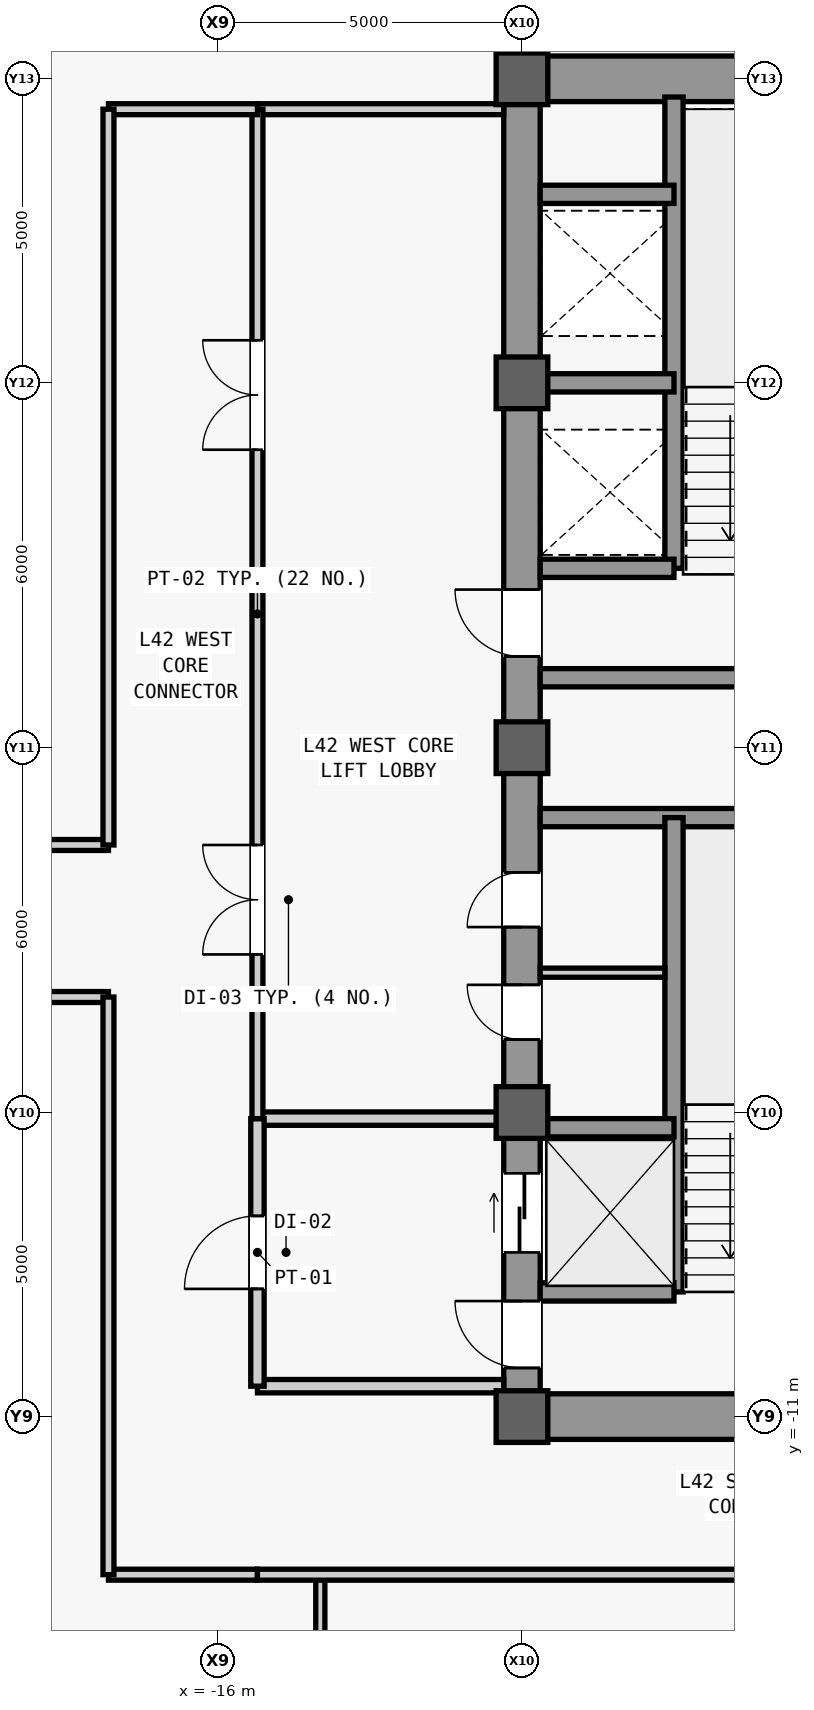
"""IFC4 building model, lengths in metres.
Left out: names, types, materials, properties, quantities, classifications, styles, units other than length and angle.
Written with IfcOpenShell. Run it as: python <this file> out.ifc"""

import sys

from ifc_helpers import new_model, si_unit, direction, frame, frame_2d, origin, origin_2d, place, context, subcontext, project, spatial, rectangle, extrude, source, transform, mapped, element, fill, save


model = new_model("IFC4")
c1 = context("Model", 3, precision=1e-05, world=origin(), true_north=direction((0.0, 1.0)))
c2 = subcontext(c1, "Body", "Model", "MODEL_VIEW")
j1 = project(units=[si_unit("LENGTHUNIT", "METRE"), si_unit("PLANEANGLEUNIT", "RADIAN")], contexts=[c1])
p1 = place(None, origin())
s1 = spatial("IfcSite", under=j1, at=p1, CompositionType="ELEMENT")
p2 = place(p1, origin())
s2 = spatial("IfcBuilding", under=s1, at=p2, CompositionType="ELEMENT")
p3 = place(p2, frame((0.0, 0.0, 183.1)))
s3 = spatial("IfcBuildingStorey", under=s2, at=p3, CompositionType="ELEMENT", Elevation=183.1)
m1 = source(origin(), c2, "Body", "SweptSolid", [
    extrude(rectangle(XDim=22.0, YDim=0.6, at=frame_2d((11.0, 0.0))), origin(), (0.0, 0.0, 1.0), 3.78),
])
p4 = place(p3, frame((-11.0, -11.0, 0.0), z_axis=(0.0, 0.0, 1.0), x_axis=(0.0, 1.0, 0.0)))
e1 = element("IfcWall", 1, at=p4, inside=s3, PredefinedType="SHEAR", context=c2, shape_type="MappedRepresentation", body=[
    mapped(m1, transform((0.0, 0.0, 0.0), scale=1.0)),
])
m2 = source(origin(), c2, "Body", "SweptSolid", [
    extrude(rectangle(XDim=1.1, YDim=2.2, at=frame_2d((0.55, 1.1))), frame((0.0, 0.31, 0.0), z_axis=(0.0, -1.0, 0.0), x_axis=(1.0, 0.0, 0.0)), (0.0, 0.0, 1.0), 0.62),
])
p5 = place(p4, frame((0.8, 0.0, 0.0)))
e2 = element("IfcOpeningElement", 2, at=p5, cuts=e1, PredefinedType="OPENING", context=c2, shape_type="MappedRepresentation", body=[
    mapped(m2, transform((0.0, 0.0, 0.0), scale=1.0)),
])
p6 = place(p4, frame((12.5, 0.0, 0.0)))
e3 = element("IfcOpeningElement", 3, at=p6, cuts=e1, PredefinedType="OPENING", context=c2, shape_type="MappedRepresentation", body=[
    mapped(m2, transform((0.0, 0.0, 0.0), scale=1.0)),
])
m3 = source(origin(), c2, "Body", "SweptSolid", [
    extrude(rectangle(XDim=0.9, YDim=2.15, at=frame_2d((0.45, 1.075))), frame((0.0, 0.31, 0.0), z_axis=(0.0, -1.0, 0.0), x_axis=(1.0, 0.0, 0.0)), (0.0, 0.0, 1.0), 0.62),
])
p7 = place(p4, frame((6.2, 0.0, 0.0)))
e4 = element("IfcOpeningElement", 4, at=p7, cuts=e1, PredefinedType="OPENING", context=c2, shape_type="MappedRepresentation", body=[
    mapped(m3, transform((0.0, 0.0, 0.0), scale=1.0)),
])
p8 = place(p4, frame((8.05, 0.0, 0.0)))
e5 = element("IfcOpeningElement", 5, at=p8, cuts=e1, PredefinedType="OPENING", context=c2, shape_type="MappedRepresentation", body=[
    mapped(m3, transform((0.0, 0.0, 0.0), scale=1.0)),
])
m4 = source(origin(), c2, "Body", "SweptSolid", [
    extrude(rectangle(XDim=1.3, YDim=2.3, at=frame_2d((0.65, 1.15))), frame((0.0, 0.31, 0.0), z_axis=(0.0, -1.0, 0.0), x_axis=(1.0, 0.0, 0.0)), (0.0, 0.0, 1.0), 0.62),
])
p9 = place(p4, frame((2.7, 0.0, 0.0)))
e6 = element("IfcOpeningElement", 6, at=p9, cuts=e1, PredefinedType="OPENING", context=c2, shape_type="MappedRepresentation", body=[
    mapped(m4, transform((0.0, 0.0, 0.0), scale=1.0)),
])
m5 = source(origin(), c2, "Body", "SweptSolid", [
    extrude(rectangle(XDim=5.85, YDim=0.75, at=frame_2d((2.925, 0.0))), origin(), (0.0, 0.0, 1.0), 3.78),
])
for number, where, z_axis, x_axis in (
    (7, (-10.7, -11.0, 0.0), (0.0, 0.0, 1.0), (1.0, 0.0, 0.0)),
    (8, (-10.7, 11.0, 0.0), (0.0, 0.0, 1.0), (1.0, 0.0, 0.0)),
):
    element("IfcWall", number, at=place(p3, frame(where, z_axis=z_axis, x_axis=x_axis)), inside=s3, PredefinedType="SHEAR", context=c2, shape_type="MappedRepresentation", body=[
        mapped(m5, transform((0.0, 0.0, 0.0), scale=1.0)),
    ])
m6 = source(origin(), c2, "Body", "SweptSolid", [
    extrude(rectangle(XDim=5.6, YDim=0.3, at=frame_2d((2.8, 0.0))), origin(), (0.0, 0.0, 1.0), 3.78),
])
for number, where, z_axis, x_axis in (
    (9, (-10.7, -1.15, 0.0), (0.0, 0.0, 1.0), (1.0, 0.0, 0.0)),
    (10, (-10.7, 1.15, 0.0), (0.0, 0.0, 1.0), (1.0, 0.0, 0.0)),
):
    element("IfcWall", number, at=place(p3, frame(where, z_axis=z_axis, x_axis=x_axis)), inside=s3, PredefinedType="SHEAR", context=c2, shape_type="MappedRepresentation", body=[
        mapped(m6, transform((0.0, 0.0, 0.0), scale=1.0)),
    ])
m7 = source(origin(), c2, "Body", "SweptSolid", [
    extrude(rectangle(XDim=0.85, YDim=0.85, at=origin_2d()), origin(), (0.0, 0.0, 1.0), 4.0),
])
for number, where, z_axis, x_axis in (
    (11, (-11.0, -11.0, 0.0), (0.0, 0.0, 1.0), (1.0, 0.0, 0.0)),
    (12, (-11.0, -6.0, 0.0), (0.0, 0.0, 1.0), (1.0, 0.0, 0.0)),
    (13, (-11.0, 0.0, 0.0), (0.0, 0.0, 1.0), (1.0, 0.0, 0.0)),
    (14, (-11.0, 6.0, 0.0), (0.0, 0.0, 1.0), (1.0, 0.0, 0.0)),
    (15, (-11.0, 11.0, 0.0), (0.0, 0.0, 1.0), (1.0, 0.0, 0.0)),
):
    element("IfcColumn", number, at=place(p3, frame(where, z_axis=z_axis, x_axis=x_axis)), inside=s3, PredefinedType="COLUMN", context=c2, shape_type="MappedRepresentation", body=[
        mapped(m7, transform((0.0, 0.0, 0.0), scale=1.0)),
    ])
m8 = source(origin(), c2, "Body", "SweptSolid", [
    extrude(rectangle(XDim=7.8, YDim=0.3, at=frame_2d((3.9, 0.0))), origin(), (0.0, 0.0, 1.0), 3.78),
])
p10 = place(p3, frame((-8.5, -8.95, 0.0), z_axis=(0.0, 0.0, 1.0), x_axis=(0.0, 1.0, 0.0)))
e16 = element("IfcWall", 16, at=p10, inside=s3, PredefinedType="SHEAR", context=c2, shape_type="MappedRepresentation", body=[
    mapped(m8, transform((0.0, 0.0, 0.0), scale=1.0)),
])
m9 = source(origin(), c2, "Body", "SweptSolid", [
    extrude(rectangle(XDim=2.2, YDim=0.3, at=frame_2d((1.1, 0.0))), origin(), (0.0, 0.0, 1.0), 3.78),
])
for number, where, z_axis, x_axis in (
    (17, (-10.7, -8.95, 0.0), (0.0, 0.0, 1.0), (1.0, 0.0, 0.0)),
    (18, (-10.7, -6.25, 0.0), (0.0, 0.0, 1.0), (1.0, 0.0, 0.0)),
):
    element("IfcWall", number, at=place(p3, frame(where, z_axis=z_axis, x_axis=x_axis)), inside=s3, PredefinedType="SHEAR", context=c2, shape_type="MappedRepresentation", body=[
        mapped(m9, transform((0.0, 0.0, 0.0), scale=1.0)),
    ])
m10 = source(origin(), c2, "Body", "SweptSolid", [
    extrude(rectangle(XDim=7.75, YDim=0.3, at=frame_2d((3.875, 0.0))), origin(), (0.0, 0.0, 1.0), 3.78),
])
p11 = place(p3, frame((-8.5, 2.95, 0.0), z_axis=(0.0, 0.0, 1.0), x_axis=(0.0, 1.0, 0.0)))
e19 = element("IfcWall", 19, at=p11, inside=s3, PredefinedType="SHEAR", context=c2, shape_type="MappedRepresentation", body=[
    mapped(m10, transform((0.0, 0.0, 0.0), scale=1.0)),
])
for number, where, z_axis, x_axis in (
    (20, (-10.7, 2.95, 0.0), (0.0, 0.0, 1.0), (1.0, 0.0, 0.0)),
    (21, (-10.7, 6.0, 0.0), (0.0, 0.0, 1.0), (1.0, 0.0, 0.0)),
    (22, (-10.7, 9.1, 0.0), (0.0, 0.0, 1.0), (1.0, 0.0, 0.0)),
):
    element("IfcWall", number, at=place(p3, frame(where, z_axis=z_axis, x_axis=x_axis)), inside=s3, PredefinedType="SHEAR", context=c2, shape_type="MappedRepresentation", body=[
        mapped(m9, transform((0.0, 0.0, 0.0), scale=1.0)),
    ])
m11 = source(origin(), c2, "Body", "SweptSolid", [
    extrude(rectangle(XDim=2.05, YDim=0.15, at=frame_2d((1.025, 0.0))), origin(), (0.0, 0.0, 1.0), 3.78),
])
p12 = place(p3, frame((-10.7, -3.7, 0.0), z_axis=(0.0, 0.0, 1.0), x_axis=(1.0, 0.0, 0.0)))
e23 = element("IfcWall", 23, at=p12, inside=s3, PredefinedType="PARTITIONING", context=c2, shape_type="MappedRepresentation", body=[
    mapped(m11, transform((0.0, 0.0, 0.0), scale=1.0)),
])
m12 = source(origin(), c2, "Body", "SweptSolid", [
    extrude(rectangle(XDim=4.05, YDim=0.22, at=frame_2d((2.025, 0.0))), origin(), (0.0, 0.0, 1.0), 3.78),
])
p13 = place(p3, frame((-15.35, -10.5, 0.0), z_axis=(0.0, 0.0, 1.0), x_axis=(1.0, 0.0, 0.0)))
e24 = element("IfcWall", 24, at=p13, inside=s3, PredefinedType="PARTITIONING", context=c2, shape_type="MappedRepresentation", body=[
    mapped(m12, transform((0.0, 0.0, 0.0), scale=1.0)),
])
m13 = source(origin(), c2, "Body", "SweptSolid", [
    extrude(rectangle(XDim=4.05, YDim=0.22, at=frame_2d((2.025, 0.0))), origin(), (0.0, 0.0, 1.0), 3.007),
])
p14 = place(p3, frame((-15.35, -6.1, 0.0), z_axis=(0.0, 0.0, 1.0), x_axis=(1.0, 0.0, 0.0)))
e25 = element("IfcWall", 25, at=p14, inside=s3, PredefinedType="PARTITIONING", context=c2, shape_type="MappedRepresentation", body=[
    mapped(m13, transform((0.0, 0.0, 0.0), scale=1.0)),
])
m14 = source(origin(), c2, "Body", "SweptSolid", [
    extrude(rectangle(XDim=4.4, YDim=0.22, at=frame_2d((2.2, 0.0))), origin(), (0.0, 0.0, 1.0), 3.78),
])
p15 = place(p3, frame((-15.35, -10.5, 0.0), z_axis=(0.0, 0.0, 1.0), x_axis=(0.0, 1.0, 0.0)))
e26 = element("IfcWall", 26, at=p15, inside=s3, PredefinedType="PARTITIONING", context=c2, shape_type="MappedRepresentation", body=[
    mapped(m14, transform((0.0, 0.0, 0.0), scale=1.0)),
])
m15 = source(origin(), c2, "Body", "SweptSolid", [
    extrude(rectangle(XDim=1.2, YDim=2.2, at=frame_2d((0.6, 1.1))), frame((0.0, 0.12, 0.0), z_axis=(0.0, -1.0, 0.0), x_axis=(1.0, 0.0, 0.0)), (0.0, 0.0, 1.0), 0.24),
])
p16 = place(p15, frame((1.6, 0.0, 0.0)))
e27 = element("IfcOpeningElement", 27, at=p16, cuts=e26, PredefinedType="OPENING", context=c2, shape_type="MappedRepresentation", body=[
    mapped(m15, transform((0.0, 0.0, 0.0), scale=1.0)),
])
m16 = source(origin(), c2, "Body", "SweptSolid", [
    extrude(rectangle(XDim=4.05, YDim=0.18, at=frame_2d((2.025, 0.0))), origin(), (0.0, 0.0, 1.0), 3.78),
])
p17 = place(p3, frame((-15.35, 10.5, 0.0), z_axis=(0.0, 0.0, 1.0), x_axis=(1.0, 0.0, 0.0)))
e28 = element("IfcWall", 28, at=p17, inside=s3, PredefinedType="PARTITIONING", context=c2, shape_type="MappedRepresentation", body=[
    mapped(m16, transform((0.0, 0.0, 0.0), scale=1.0)),
])
m17 = source(origin(), c2, "Body", "SweptSolid", [
    extrude(rectangle(XDim=16.6, YDim=0.18, at=frame_2d((8.3, 0.0))), origin(), (0.0, 0.0, 1.0), 3.78),
])
p18 = place(p3, frame((-15.35, -6.1, 0.0), z_axis=(0.0, 0.0, 1.0), x_axis=(0.0, 1.0, 0.0)))
e29 = element("IfcWall", 29, at=p18, inside=s3, PredefinedType="PARTITIONING", context=c2, shape_type="MappedRepresentation", body=[
    mapped(m17, transform((0.0, 0.0, 0.0), scale=1.0)),
])
m18 = source(origin(), c2, "Body", "SweptSolid", [
    extrude(rectangle(XDim=1.8, YDim=2.25, at=frame_2d((0.9, 1.125))), frame((0.0, 0.1, 0.0), z_axis=(0.0, -1.0, 0.0), x_axis=(1.0, 0.0, 0.0)), (0.0, 0.0, 1.0), 0.2),
])
p19 = place(p18, frame((2.7, 0.0, 0.0)))
e30 = element("IfcOpeningElement", 30, at=p19, cuts=e29, PredefinedType="OPENING", context=c2, shape_type="MappedRepresentation", body=[
    mapped(m18, transform((0.0, 0.0, 0.0), scale=1.0)),
])
p20 = place(p18, frame((11.0, 0.0, 0.0)))
e31 = element("IfcOpeningElement", 31, at=p20, cuts=e29, PredefinedType="OPENING", context=c2, shape_type="MappedRepresentation", body=[
    mapped(m18, transform((0.0, 0.0, 0.0), scale=1.0)),
])
m19 = source(origin(), c2, "Body", "SweptSolid", [
    extrude(rectangle(XDim=2.45, YDim=0.18, at=frame_2d((1.225, 0.0))), origin(), (0.0, 0.0, 1.0), 3.78),
])
for number, where, z_axis, x_axis in (
    (32, (-17.8, 10.5, 0.0), (0.0, 0.0, 1.0), (1.0, 0.0, 0.0)),
    (33, (-17.8, -13.6, 0.0), (0.0, 0.0, 1.0), (1.0, 0.0, 0.0)),
):
    element("IfcWall", number, at=place(p3, frame(where, z_axis=z_axis, x_axis=x_axis)), inside=s3, PredefinedType="PARTITIONING", context=c2, shape_type="MappedRepresentation", body=[
        mapped(m19, transform((0.0, 0.0, 0.0), scale=1.0)),
    ])
m20 = source(origin(), c2, "Body", "SweptSolid", [
    extrude(rectangle(XDim=16.4, YDim=0.15, at=frame_2d((8.2, 0.0))), origin(), (0.0, 0.0, 1.0), 3.78),
])
p21 = place(p3, frame((-14.316, -30.0, 0.0), z_axis=(0.0, 0.0, 1.0), x_axis=(0.0, 1.0, 0.0)))
e34 = element("IfcWall", 34, at=p21, inside=s3, PredefinedType="PARTITIONING", context=c2, shape_type="MappedRepresentation", body=[
    mapped(m20, transform((0.0, 0.0, 0.0), scale=1.0)),
])
m21 = source(origin(), c2, "Body", "SweptSolid", [
    extrude(rectangle(XDim=0.95, YDim=2.15, at=frame_2d((0.475, 1.075))), frame((0.0, 0.085, 0.0), z_axis=(0.0, -1.0, 0.0), x_axis=(1.0, 0.0, 0.0)), (0.0, 0.0, 1.0), 0.17),
])
p22 = place(p21, frame((11.825, 0.0, 0.0)))
e35 = element("IfcOpeningElement", 35, at=p22, cuts=e34, PredefinedType="OPENING", context=c2, shape_type="MappedRepresentation", body=[
    mapped(m21, transform((0.0, 0.0, 0.0), scale=1.0)),
])
m22 = source(origin(), c2, "Body", "SweptSolid", [
    extrude(rectangle(XDim=13.15, YDim=0.18, at=frame_2d((6.575, 0.0))), origin(), (0.0, 0.0, 1.0), 3.78),
])
p23 = place(p3, frame((-15.35, -13.6, 0.0), z_axis=(0.0, 0.0, 1.0), x_axis=(1.0, 0.0, 0.0)))
e36 = element("IfcWall", 36, at=p23, inside=s3, PredefinedType="PARTITIONING", context=c2, shape_type="MappedRepresentation", body=[
    mapped(m22, transform((0.0, 0.0, 0.0), scale=1.0)),
])
m23 = source(origin(), c2, "Body", "SweptSolid", [
    extrude(rectangle(XDim=12.2, YDim=0.18, at=frame_2d((6.1, 0.0))), origin(), (0.0, 0.0, 1.0), 3.78),
])
p24 = place(p3, frame((-30.0, -4.1, 0.0), z_axis=(0.0, 0.0, 1.0), x_axis=(1.0, 0.0, 0.0)))
e37 = element("IfcWall", 37, at=p24, inside=s3, PredefinedType="PARTITIONING", context=c2, shape_type="MappedRepresentation", body=[
    mapped(m23, transform((0.0, 0.0, 0.0), scale=1.0)),
])
m24 = source(origin(), c2, "Body", "SweptSolid", [
    extrude(rectangle(XDim=0.95, YDim=2.15, at=frame_2d((0.475, 1.075))), frame((0.0, 0.1, 0.0), z_axis=(0.0, -1.0, 0.0), x_axis=(1.0, 0.0, 0.0)), (0.0, 0.0, 1.0), 0.2),
])
p25 = place(p24, frame((5.625, 0.0, 0.0)))
e38 = element("IfcOpeningElement", 38, at=p25, cuts=e37, PredefinedType="OPENING", context=c2, shape_type="MappedRepresentation", body=[
    mapped(m24, transform((0.0, 0.0, 0.0), scale=1.0)),
])
m25 = source(origin(), c2, "Body", "SweptSolid", [
    extrude(rectangle(XDim=9.5, YDim=0.18, at=frame_2d((4.75, 0.0))), origin(), (0.0, 0.0, 1.0), 3.78),
])
p26 = place(p3, frame((-17.8, -13.6, 0.0), z_axis=(0.0, 0.0, 1.0), x_axis=(0.0, 1.0, 0.0)))
e39 = element("IfcWall", 39, at=p26, inside=s3, PredefinedType="PARTITIONING", context=c2, shape_type="MappedRepresentation", body=[
    mapped(m25, transform((0.0, 0.0, 0.0), scale=1.0)),
])
p27 = place(p3, frame((-30.0, -1.6, 0.0), z_axis=(0.0, 0.0, 1.0), x_axis=(1.0, 0.0, 0.0)))
e40 = element("IfcWall", 40, at=p27, inside=s3, PredefinedType="PARTITIONING", context=c2, shape_type="MappedRepresentation", body=[
    mapped(m23, transform((0.0, 0.0, 0.0), scale=1.0)),
])
p28 = place(p27, frame((5.625, 0.0, 0.0)))
e41 = element("IfcOpeningElement", 41, at=p28, cuts=e40, PredefinedType="OPENING", context=c2, shape_type="MappedRepresentation", body=[
    mapped(m24, transform((0.0, 0.0, 0.0), scale=1.0)),
])
m26 = source(origin(), c2, "Body", "SweptSolid", [
    extrude(rectangle(XDim=12.1, YDim=0.18, at=frame_2d((6.05, 0.0))), origin(), (0.0, 0.0, 1.0), 3.78),
])
p29 = place(p3, frame((-17.8, -1.6, 0.0), z_axis=(0.0, 0.0, 1.0), x_axis=(0.0, 1.0, 0.0)))
e42 = element("IfcWall", 42, at=p29, inside=s3, PredefinedType="PARTITIONING", context=c2, shape_type="MappedRepresentation", body=[
    mapped(m26, transform((0.0, 0.0, 0.0), scale=1.0)),
])
m27 = source(origin(), c2, "Body", "SweptSolid", [
    extrude(rectangle(XDim=1.1, YDim=2.2, at=frame_2d((0.55, 1.1))), frame((0.0, 0.025, 0.0), z_axis=(0.0, -1.0, 0.0), x_axis=(1.0, 0.0, 0.0)), (0.0, 0.0, 1.0), 0.05),
])
p30 = place(p5, origin())
e43 = element("IfcDoor", 43, at=p30, inside=s3, OperationType="SINGLE_SWING_RIGHT", PredefinedType="DOOR", context=c2, shape_type="MappedRepresentation", body=[
    mapped(m27, transform((0.0, 0.0, 0.0), scale=1.0)),
])
fill(e2, e43)
p31 = place(p6, origin())
e44 = element("IfcDoor", 44, at=p31, inside=s3, OperationType="SINGLE_SWING_RIGHT", PredefinedType="DOOR", context=c2, shape_type="MappedRepresentation", body=[
    mapped(m27, transform((0.0, 0.0, 0.0), scale=1.0)),
])
fill(e3, e44)
m28 = source(origin(), c2, "Body", "SweptSolid", [
    extrude(rectangle(XDim=0.9, YDim=2.15, at=frame_2d((0.45, 1.075))), frame((0.0, 0.025, 0.0), z_axis=(0.0, -1.0, 0.0), x_axis=(1.0, 0.0, 0.0)), (0.0, 0.0, 1.0), 0.05),
])
p32 = place(p7, origin())
e45 = element("IfcDoor", 45, at=p32, inside=s3, OperationType="SINGLE_SWING_RIGHT", PredefinedType="DOOR", context=c2, shape_type="MappedRepresentation", body=[
    mapped(m28, transform((0.0, 0.0, 0.0), scale=1.0)),
])
fill(e4, e45)
p33 = place(p8, origin())
e46 = element("IfcDoor", 46, at=p33, inside=s3, OperationType="SINGLE_SWING_LEFT", PredefinedType="DOOR", context=c2, shape_type="MappedRepresentation", body=[
    mapped(m28, transform((0.0, 0.0, 0.0), scale=1.0)),
])
fill(e5, e46)
m29 = source(origin(), c2, "Body", "SweptSolid", [
    extrude(rectangle(XDim=1.2, YDim=2.2, at=frame_2d((0.6, 1.1))), frame((0.0, 0.025, 0.0), z_axis=(0.0, -1.0, 0.0), x_axis=(1.0, 0.0, 0.0)), (0.0, 0.0, 1.0), 0.05),
])
p34 = place(p16, origin())
e47 = element("IfcDoor", 47, at=p34, inside=s3, OperationType="SINGLE_SWING_LEFT", PredefinedType="DOOR", context=c2, shape_type="MappedRepresentation", body=[
    mapped(m29, transform((0.0, 0.0, 0.0), scale=1.0)),
])
fill(e27, e47)
m30 = source(origin(), c2, "Body", "SweptSolid", [
    extrude(rectangle(XDim=1.8, YDim=2.25, at=frame_2d((0.9, 1.125))), frame((0.0, 0.025, 0.0), z_axis=(0.0, -1.0, 0.0), x_axis=(1.0, 0.0, 0.0)), (0.0, 0.0, 1.0), 0.05),
])
p35 = place(p19, origin())
e48 = element("IfcDoor", 48, at=p35, inside=s3, OperationType="SINGLE_SWING_LEFT", PredefinedType="DOOR", context=c2, shape_type="MappedRepresentation", body=[
    mapped(m30, transform((0.0, 0.0, 0.0), scale=1.0)),
])
fill(e30, e48)
p36 = place(p20, origin())
e49 = element("IfcDoor", 49, at=p36, inside=s3, OperationType="SINGLE_SWING_RIGHT", PredefinedType="DOOR", context=c2, shape_type="MappedRepresentation", body=[
    mapped(m30, transform((0.0, 0.0, 0.0), scale=1.0)),
])
fill(e31, e49)
m31 = source(origin(), c2, "Body", "SweptSolid", [
    extrude(rectangle(XDim=1.3, YDim=2.3, at=frame_2d((0.65, 1.15))), frame((0.0, 0.025, 0.0), z_axis=(0.0, -1.0, 0.0), x_axis=(1.0, 0.0, 0.0)), (0.0, 0.0, 1.0), 0.05),
])
p37 = place(p9, origin())
e50 = element("IfcDoor", 50, at=p37, inside=s3, OperationType="SLIDING_TO_LEFT", PredefinedType="DOOR", context=c2, shape_type="MappedRepresentation", body=[
    mapped(m31, transform((0.0, 0.0, 0.0), scale=1.0)),
])
fill(e6, e50)
save(model, sys.argv[1])
